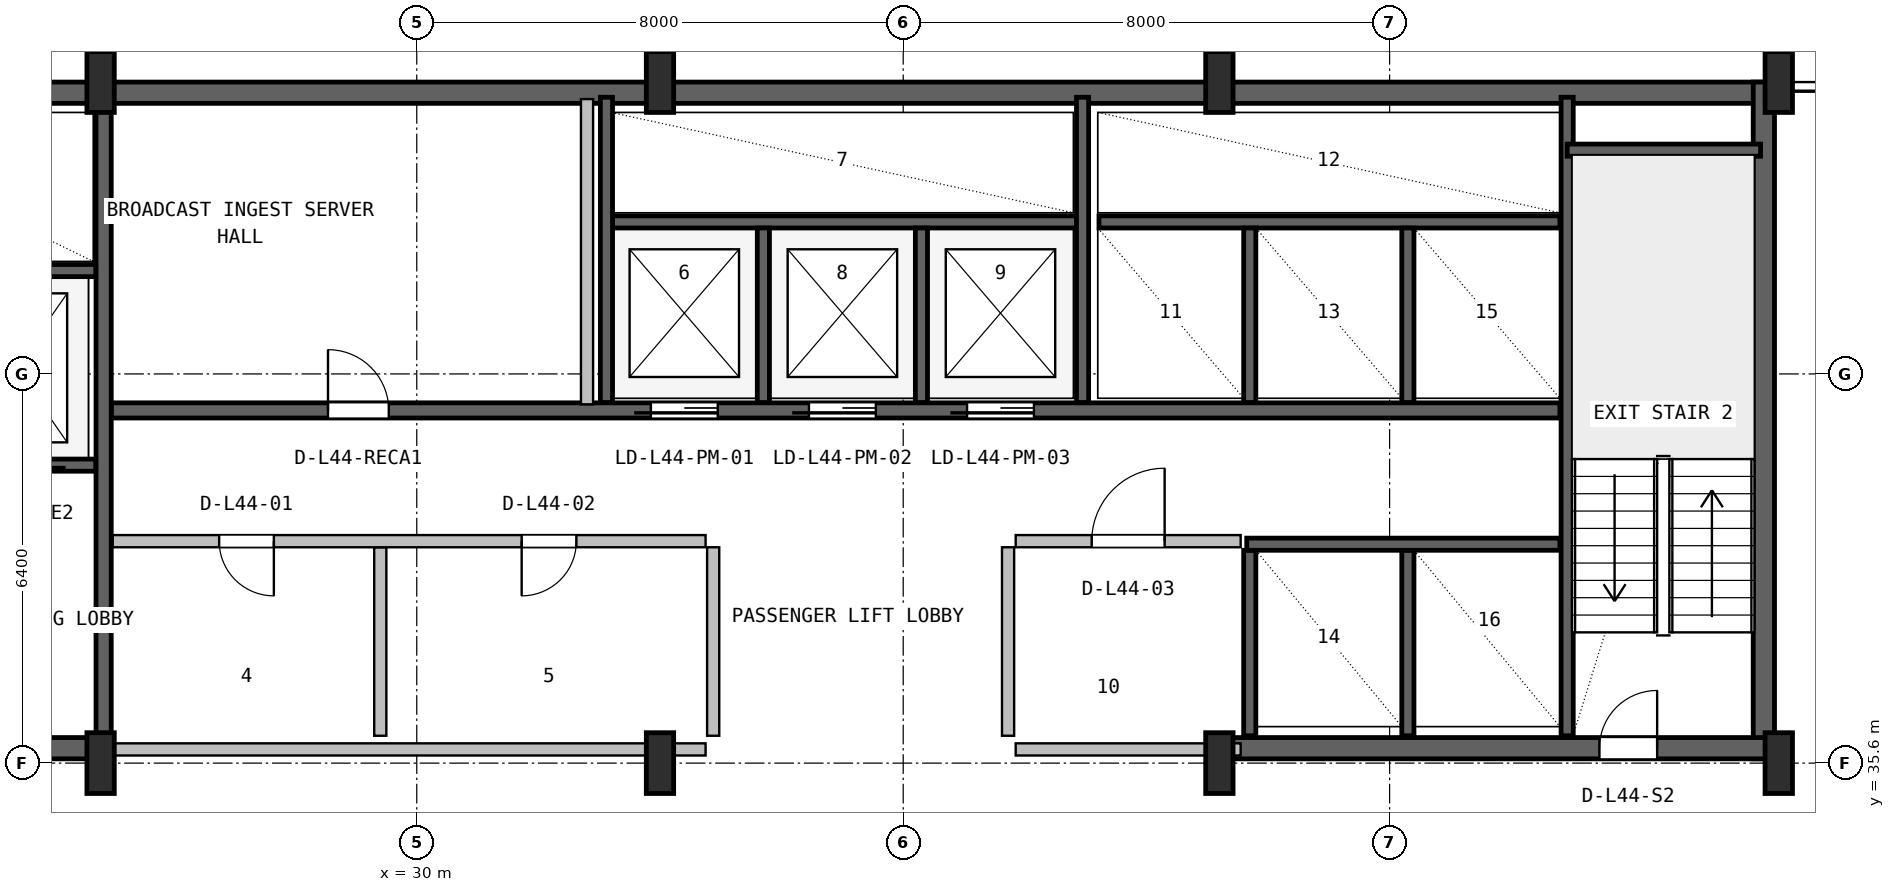
"""IFC4 building model, lengths in metres.
Left out: names, types, materials, properties, quantities, classifications, styles, units other than length and angle.
Written with IfcOpenShell. Run it as: python <this file> out.ifc"""

import sys

from ifc_helpers import new_model, si_unit, direction, frame, frame_2d, origin, origin_2d, place, context, subcontext, project, spatial, rectangle, i_section, extrude, source, transform, mapped, element, fill, save


model = new_model("IFC4")
c1 = context("Model", 3, precision=1e-05, world=origin(), true_north=direction((0.0, 1.0)))
c2 = subcontext(c1, "Body", "Model", "MODEL_VIEW")
j1 = project(units=[si_unit("LENGTHUNIT", "METRE"), si_unit("PLANEANGLEUNIT", "RADIAN")], contexts=[c1])
p1 = place(None, origin())
s1 = spatial("IfcSite", under=j1, at=p1, CompositionType="ELEMENT")
p2 = place(p1, origin())
s2 = spatial("IfcBuilding", under=s1, at=p2, CompositionType="ELEMENT")
p3 = place(p2, frame((0.0, 0.0, 180.0)))
s3 = spatial("IfcBuildingStorey", under=s2, at=p3, CompositionType="ELEMENT", Elevation=180.0)
p4 = place(p3, frame((15.6, 46.625, 0.0), z_axis=(0.0, 0.0, 1.0), x_axis=(1.0, 0.0, 0.0)))
e1 = element("IfcWall", 1, at=p4, inside=s3, PredefinedType="SHEAR", context=c2, shape_type="SweptSolid", body=[
    extrude(rectangle(XDim=36.8, YDim=0.35, at=frame_2d((18.4, 0.0))), origin(), (0.0, 0.0, 1.0), 3.55),
])
p5 = place(p3, frame((52.155, 35.67, 0.0), z_axis=(0.0, 0.0, 1.0), x_axis=(0.0, 1.0, 0.0)))
e2 = element("IfcWall", 2, at=p5, inside=s3, PredefinedType="SHEAR", context=c2, shape_type="SweptSolid", body=[
    extrude(rectangle(XDim=11.13, YDim=0.35, at=frame_2d((5.565, 0.0))), origin(), (0.0, 0.0, 1.0), 3.55),
])
p6 = place(p3, frame((15.67, 35.845, 0.0), z_axis=(0.0, 0.0, 1.0), x_axis=(1.0, 0.0, 0.0)))
e3 = element("IfcWall", 3, at=p6, inside=s3, PredefinedType="SHEAR", context=c2, shape_type="SweptSolid", body=[
    extrude(rectangle(XDim=9.13, YDim=0.35, at=frame_2d((4.565, 0.0))), origin(), (0.0, 0.0, 1.0), 3.55),
])
p7 = place(p6, frame((5.4, 0.0, 0.0)))
e4 = element("IfcOpeningElement", 4, at=p7, cuts=e3, PredefinedType="OPENING", context=c2, shape_type="SweptSolid", body=[
    extrude(rectangle(XDim=1.0, YDim=2.1, at=frame_2d((0.5, 1.05))), frame((0.0, 0.185, 0.0), z_axis=(0.0, -1.0, 0.0), x_axis=(1.0, 0.0, 0.0)), (0.0, 0.0, 1.0), 0.37),
])
p8 = place(p3, frame((43.2, 35.845, 0.0), z_axis=(0.0, 0.0, 1.0), x_axis=(1.0, 0.0, 0.0)))
e5 = element("IfcWall", 5, at=p8, inside=s3, PredefinedType="SHEAR", context=c2, shape_type="SweptSolid", body=[
    extrude(rectangle(XDim=9.13, YDim=0.35, at=frame_2d((4.565, 0.0))), origin(), (0.0, 0.0, 1.0), 3.55),
])
p9 = place(p8, frame((6.25, 0.0, 0.0)))
e6 = element("IfcOpeningElement", 6, at=p9, cuts=e5, PredefinedType="OPENING", context=c2, shape_type="SweptSolid", body=[
    extrude(rectangle(XDim=0.95, YDim=2.1, at=frame_2d((0.475, 1.05))), frame((0.0, 0.185, 0.0), z_axis=(0.0, -1.0, 0.0), x_axis=(1.0, 0.0, 0.0)), (0.0, 0.0, 1.0), 0.37),
])
m1 = source(origin(), c2, "Body", "SweptSolid", [
    extrude(i_section(OverallWidth=0.45, OverallDepth=1.0, WebThickness=0.016, FlangeThickness=0.03, FilletRadius=0.016, at=origin_2d()), origin(), (0.0, 0.0, 1.0), 3.8),
])
for number, where, z_axis, x_axis in (
    (7, (24.8, 35.6, 0.0), (0.0, 0.0, 1.0), (1.0, 0.0, 0.0)),
    (8, (24.8, 46.8, 0.0), (0.0, 0.0, 1.0), (1.0, 0.0, 0.0)),
    (9, (34.0, 35.6, 0.0), (0.0, 0.0, 1.0), (1.0, 0.0, 0.0)),
    (10, (34.0, 46.8, 0.0), (0.0, 0.0, 1.0), (1.0, 0.0, 0.0)),
    (11, (43.2, 35.6, 0.0), (0.0, 0.0, 1.0), (1.0, 0.0, 0.0)),
    (12, (43.2, 46.8, 0.0), (0.0, 0.0, 1.0), (1.0, 0.0, 0.0)),
    (13, (52.4, 35.6, 0.0), (0.0, 0.0, 1.0), (1.0, 0.0, 0.0)),
    (14, (52.4, 46.8, 0.0), (0.0, 0.0, 1.0), (1.0, 0.0, 0.0)),
):
    element("IfcColumn", number, at=place(p3, frame(where, z_axis=z_axis, x_axis=x_axis)), inside=s3, PredefinedType="COLUMN", context=c2, shape_type="MappedRepresentation", body=[
        mapped(m1, transform((0.0, 0.0, 0.0), x_axis=(1.0, 0.0, 0.0), y_axis=(0.0, 1.0, 0.0), z_axis=(0.0, 0.0, 1.0), scale=1.0)),
    ])
p10 = place(p3, frame((24.85, 36.05, 0.0), z_axis=(0.0, 0.0, 1.0), x_axis=(0.0, 1.0, 0.0)))
e15 = element("IfcWall", 15, at=p10, inside=s3, PredefinedType="SHEAR", context=c2, shape_type="SweptSolid", body=[
    extrude(rectangle(XDim=10.45, YDim=0.25, at=frame_2d((5.225, 0.0))), origin(), (0.0, 0.0, 1.0), 3.55),
])
p11 = place(p3, frame((19.2, 40.5, 0.0), z_axis=(0.0, 0.0, 1.0), x_axis=(1.0, 0.0, 0.0)))
e16 = element("IfcWall", 16, at=p11, inside=s3, PredefinedType="SHEAR", context=c2, shape_type="SweptSolid", body=[
    extrude(rectangle(XDim=5.52, YDim=0.2, at=frame_2d((2.76, 0.0))), origin(), (0.0, 0.0, 1.0), 3.55),
])
p12 = place(p11, frame((1.05, 0.0, 0.0)))
e17 = element("IfcOpeningElement", 17, at=p12, cuts=e16, PredefinedType="OPENING", context=c2, shape_type="SweptSolid", body=[
    extrude(rectangle(XDim=1.1, YDim=2.18, at=frame_2d((0.55, 1.09))), frame((0.0, 0.11, 0.0), z_axis=(0.0, -1.0, 0.0), x_axis=(1.0, 0.0, 0.0)), (0.0, 0.0, 1.0), 0.22),
])
p13 = place(p11, frame((3.65, 0.0, 0.0)))
e18 = element("IfcOpeningElement", 18, at=p13, cuts=e16, PredefinedType="OPENING", context=c2, shape_type="SweptSolid", body=[
    extrude(rectangle(XDim=1.1, YDim=2.18, at=frame_2d((0.55, 1.09))), frame((0.0, 0.11, 0.0), z_axis=(0.0, -1.0, 0.0), x_axis=(1.0, 0.0, 0.0)), (0.0, 0.0, 1.0), 0.22),
])
p14 = place(p3, frame((19.2, 43.7, 0.0), z_axis=(0.0, 0.0, 1.0), x_axis=(1.0, 0.0, 0.0)))
e19 = element("IfcWall", 19, at=p14, inside=s3, PredefinedType="SHEAR", context=c2, shape_type="SweptSolid", body=[
    extrude(rectangle(XDim=5.52, YDim=0.2, at=frame_2d((2.76, 0.0))), origin(), (0.0, 0.0, 1.0), 3.55),
])
p15 = place(p3, frame((48.92, 36.05, 0.0), z_axis=(0.0, 0.0, 1.0), x_axis=(0.0, 1.0, 0.0)))
e20 = element("IfcWall", 20, at=p15, inside=s3, PredefinedType="SHEAR", context=c2, shape_type="SweptSolid", body=[
    extrude(rectangle(XDim=10.5, YDim=0.2, at=frame_2d((5.25, 0.0))), origin(), (0.0, 0.0, 1.0), 3.55),
])
p16 = place(p3, frame((48.92, 45.68, 0.0), z_axis=(0.0, 0.0, 1.0), x_axis=(1.0, 0.0, 0.0)))
e21 = element("IfcWall", 21, at=p16, inside=s3, PredefinedType="SHEAR", context=c2, shape_type="SweptSolid", body=[
    extrude(rectangle(XDim=3.18, YDim=0.2, at=frame_2d((1.59, 0.0))), origin(), (0.0, 0.0, 1.0), 3.55),
])
p17 = place(p3, frame((24.98, 41.4, 0.0), z_axis=(0.0, 0.0, 1.0), x_axis=(1.0, 0.0, 0.0)))
e22 = element("IfcWall", 22, at=p17, inside=s3, PredefinedType="SHEAR", context=c2, shape_type="SweptSolid", body=[
    extrude(rectangle(XDim=23.82, YDim=0.25, at=frame_2d((11.91, 0.0))), origin(), (0.0, 0.0, 1.0), 3.55),
])
p18 = place(p17, frame((8.87, 0.0, 0.0)))
e23 = element("IfcOpeningElement", 23, at=p18, cuts=e22, PredefinedType="OPENING", context=c2, shape_type="SweptSolid", body=[
    extrude(rectangle(XDim=1.1, YDim=2.18, at=frame_2d((0.55, 1.09))), frame((0.0, 0.135, 0.0), z_axis=(0.0, -1.0, 0.0), x_axis=(1.0, 0.0, 0.0)), (0.0, 0.0, 1.0), 0.27),
])
p19 = place(p17, frame((11.47, 0.0, 0.0)))
e24 = element("IfcOpeningElement", 24, at=p19, cuts=e22, PredefinedType="OPENING", context=c2, shape_type="SweptSolid", body=[
    extrude(rectangle(XDim=1.1, YDim=2.18, at=frame_2d((0.55, 1.09))), frame((0.0, 0.135, 0.0), z_axis=(0.0, -1.0, 0.0), x_axis=(1.0, 0.0, 0.0)), (0.0, 0.0, 1.0), 0.27),
])
p20 = place(p17, frame((14.07, 0.0, 0.0)))
e25 = element("IfcOpeningElement", 25, at=p20, cuts=e22, PredefinedType="OPENING", context=c2, shape_type="SweptSolid", body=[
    extrude(rectangle(XDim=1.1, YDim=2.18, at=frame_2d((0.55, 1.09))), frame((0.0, 0.135, 0.0), z_axis=(0.0, -1.0, 0.0), x_axis=(1.0, 0.0, 0.0)), (0.0, 0.0, 1.0), 0.27),
])
p21 = place(p17, frame((3.56, 0.0, 0.0)))
e26 = element("IfcOpeningElement", 26, at=p21, cuts=e22, PredefinedType="OPENING", context=c2, shape_type="SweptSolid", body=[
    extrude(rectangle(XDim=1.0, YDim=2.08, at=frame_2d((0.5, 1.04))), frame((0.0, 0.135, 0.0), z_axis=(0.0, -1.0, 0.0), x_axis=(1.0, 0.0, 0.0)), (0.0, 0.0, 1.0), 0.27),
])
p22 = place(p3, frame((33.22, 44.5, 0.0), z_axis=(0.0, 0.0, 1.0), x_axis=(1.0, 0.0, 0.0)))
e27 = element("IfcWall", 27, at=p22, inside=s3, PredefinedType="SHEAR", context=c2, shape_type="SweptSolid", body=[
    extrude(rectangle(XDim=7.63, YDim=0.2, at=frame_2d((3.815, 0.0))), origin(), (0.0, 0.0, 1.0), 3.55),
])
p23 = place(p3, frame((33.12, 41.53, 0.0), z_axis=(0.0, 0.0, 1.0), x_axis=(0.0, 1.0, 0.0)))
e28 = element("IfcWall", 28, at=p23, inside=s3, PredefinedType="SHEAR", context=c2, shape_type="SweptSolid", body=[
    extrude(rectangle(XDim=5.02, YDim=0.2, at=frame_2d((2.51, 0.0))), origin(), (0.0, 0.0, 1.0), 3.55),
])
for number, where, z_axis, x_axis in (
    (29, (35.7, 41.53, 0.0), (0.0, 0.0, 1.0), (0.0, 1.0, 0.0)),
    (30, (38.3, 41.53, 0.0), (0.0, 0.0, 1.0), (0.0, 1.0, 0.0)),
):
    element("IfcWall", number, at=place(p3, frame(where, z_axis=z_axis, x_axis=x_axis)), inside=s3, PredefinedType="SHEAR", context=c2, shape_type="SweptSolid", body=[
        extrude(rectangle(XDim=2.87, YDim=0.2, at=frame_2d((1.435, 0.0))), origin(), (0.0, 0.0, 1.0), 3.55),
    ])
p24 = place(p3, frame((40.95, 41.53, 0.0), z_axis=(0.0, 0.0, 1.0), x_axis=(0.0, 1.0, 0.0)))
e31 = element("IfcWall", 31, at=p24, inside=s3, PredefinedType="SHEAR", context=c2, shape_type="SweptSolid", body=[
    extrude(rectangle(XDim=5.02, YDim=0.2, at=frame_2d((2.51, 0.0))), origin(), (0.0, 0.0, 1.0), 3.55),
])
p25 = place(p3, frame((41.22, 44.5, 0.0), z_axis=(0.0, 0.0, 1.0), x_axis=(1.0, 0.0, 0.0)))
e32 = element("IfcWall", 32, at=p25, inside=s3, PredefinedType="SHEAR", context=c2, shape_type="SweptSolid", body=[
    extrude(rectangle(XDim=7.58, YDim=0.2, at=frame_2d((3.79, 0.0))), origin(), (0.0, 0.0, 1.0), 3.55),
])
for number, where, z_axis, x_axis in (
    (33, (43.7, 41.53, 0.0), (0.0, 0.0, 1.0), (0.0, 1.0, 0.0)),
    (34, (46.3, 41.53, 0.0), (0.0, 0.0, 1.0), (0.0, 1.0, 0.0)),
):
    element("IfcWall", number, at=place(p3, frame(where, z_axis=z_axis, x_axis=x_axis)), inside=s3, PredefinedType="SHEAR", context=c2, shape_type="SweptSolid", body=[
        extrude(rectangle(XDim=2.87, YDim=0.2, at=frame_2d((1.435, 0.0))), origin(), (0.0, 0.0, 1.0), 3.55),
    ])
for number, where, z_axis, x_axis in (
    (35, (43.7, 36.05, 0.0), (0.0, 0.0, 1.0), (0.0, 1.0, 0.0)),
    (36, (46.3, 36.05, 0.0), (0.0, 0.0, 1.0), (0.0, 1.0, 0.0)),
):
    element("IfcWall", number, at=place(p3, frame(where, z_axis=z_axis, x_axis=x_axis)), inside=s3, PredefinedType="SHEAR", context=c2, shape_type="SweptSolid", body=[
        extrude(rectangle(XDim=3.05, YDim=0.2, at=frame_2d((1.525, 0.0))), origin(), (0.0, 0.0, 1.0), 3.55),
    ])
p26 = place(p3, frame((43.65, 39.2, 0.0), z_axis=(0.0, 0.0, 1.0), x_axis=(1.0, 0.0, 0.0)))
e37 = element("IfcWall", 37, at=p26, inside=s3, PredefinedType="SHEAR", context=c2, shape_type="SweptSolid", body=[
    extrude(rectangle(XDim=5.15, YDim=0.2, at=frame_2d((2.575, 0.0))), origin(), (0.0, 0.0, 1.0), 3.55),
])
p27 = place(p3, frame((25.0, 35.825, 0.0), z_axis=(0.0, 0.0, 1.0), x_axis=(1.0, 0.0, 0.0)))
e38 = element("IfcWall", 38, at=p27, inside=s3, PredefinedType="PLUMBINGWALL", context=c2, shape_type="SweptSolid", body=[
    extrude(rectangle(XDim=9.75, YDim=0.2, at=frame_2d((4.875, 0.0))), origin(), (0.0, 0.0, 1.0), 2.575),
])
p28 = place(p3, frame((29.4, 36.05, 0.0), z_axis=(0.0, 0.0, 1.0), x_axis=(0.0, 1.0, 0.0)))
e39 = element("IfcWall", 39, at=p28, inside=s3, PredefinedType="PLUMBINGWALL", context=c2, shape_type="SweptSolid", body=[
    extrude(rectangle(XDim=3.1, YDim=0.2, at=frame_2d((1.55, 0.0))), origin(), (0.0, 0.0, 1.0), 3.53),
])
p29 = place(p3, frame((25.0, 39.25, 0.0), z_axis=(0.0, 0.0, 1.0), x_axis=(1.0, 0.0, 0.0)))
e40 = element("IfcWall", 40, at=p29, inside=s3, PredefinedType="PLUMBINGWALL", context=c2, shape_type="SweptSolid", body=[
    extrude(rectangle(XDim=9.75, YDim=0.2, at=frame_2d((4.875, 0.0))), origin(), (0.0, 0.0, 1.0), 3.53),
])
p30 = place(p29, frame((1.75, 0.0, 0.0)))
e41 = element("IfcOpeningElement", 41, at=p30, cuts=e40, PredefinedType="OPENING", context=c2, shape_type="SweptSolid", body=[
    extrude(rectangle(XDim=0.9, YDim=2.06, at=frame_2d((0.45, 1.03))), frame((0.0, 0.11, 0.0), z_axis=(0.0, -1.0, 0.0), x_axis=(1.0, 0.0, 0.0)), (0.0, 0.0, 1.0), 0.22),
])
p31 = place(p29, frame((6.725, 0.0, 0.0)))
e42 = element("IfcOpeningElement", 42, at=p31, cuts=e40, PredefinedType="OPENING", context=c2, shape_type="SweptSolid", body=[
    extrude(rectangle(XDim=0.9, YDim=2.06, at=frame_2d((0.45, 1.03))), frame((0.0, 0.11, 0.0), z_axis=(0.0, -1.0, 0.0), x_axis=(1.0, 0.0, 0.0)), (0.0, 0.0, 1.0), 0.22),
])
p32 = place(p3, frame((34.875, 36.05, 0.0), z_axis=(0.0, 0.0, 1.0), x_axis=(0.0, 1.0, 0.0)))
e43 = element("IfcWall", 43, at=p32, inside=s3, PredefinedType="PLUMBINGWALL", context=c2, shape_type="SweptSolid", body=[
    extrude(rectangle(XDim=3.1, YDim=0.2, at=frame_2d((1.55, 0.0))), origin(), (0.0, 0.0, 1.0), 3.53),
])
p33 = place(p3, frame((39.85, 35.825, 0.0), z_axis=(0.0, 0.0, 1.0), x_axis=(1.0, 0.0, 0.0)))
e44 = element("IfcWall", 44, at=p33, inside=s3, PredefinedType="SOLIDWALL", context=c2, shape_type="SweptSolid", body=[
    extrude(rectangle(XDim=3.7, YDim=0.2, at=frame_2d((1.85, 0.0))), origin(), (0.0, 0.0, 1.0), 2.575),
])
p34 = place(p3, frame((39.85, 39.25, 0.0), z_axis=(0.0, 0.0, 1.0), x_axis=(1.0, 0.0, 0.0)))
e45 = element("IfcWall", 45, at=p34, inside=s3, PredefinedType="SOLIDWALL", context=c2, shape_type="SweptSolid", body=[
    extrude(rectangle(XDim=3.7, YDim=0.2, at=frame_2d((1.85, 0.0))), origin(), (0.0, 0.0, 1.0), 3.53),
])
p35 = place(p34, frame((1.25, 0.0, 0.0)))
e46 = element("IfcOpeningElement", 46, at=p35, cuts=e45, PredefinedType="OPENING", context=c2, shape_type="SweptSolid", body=[
    extrude(rectangle(XDim=1.2, YDim=2.1, at=frame_2d((0.6, 1.05))), frame((0.0, 0.11, 0.0), z_axis=(0.0, -1.0, 0.0), x_axis=(1.0, 0.0, 0.0)), (0.0, 0.0, 1.0), 0.22),
])
p36 = place(p3, frame((39.725, 36.05, 0.0), z_axis=(0.0, 0.0, 1.0), x_axis=(0.0, 1.0, 0.0)))
e47 = element("IfcWall", 47, at=p36, inside=s3, PredefinedType="SOLIDWALL", context=c2, shape_type="SweptSolid", body=[
    extrude(rectangle(XDim=3.1, YDim=0.2, at=frame_2d((1.55, 0.0))), origin(), (0.0, 0.0, 1.0), 3.53),
])
p37 = place(p3, frame((32.8, 41.5, 0.0), z_axis=(0.0, 0.0, 1.0), x_axis=(0.0, 1.0, 0.0)))
e48 = element("IfcWall", 48, at=p37, inside=s3, PredefinedType="SOLIDWALL", context=c2, shape_type="SweptSolid", body=[
    extrude(rectangle(XDim=5.02, YDim=0.2, at=frame_2d((2.51, 0.0))), origin(), (0.0, 0.0, 1.0), 3.53),
])
m2 = source(origin(), c2, "Body", "SweptSolid", [
    extrude(rectangle(XDim=0.95, YDim=2.1, at=frame_2d((0.475, 1.05))), frame((0.0, 0.025, 0.0), z_axis=(0.0, -1.0, 0.0), x_axis=(1.0, 0.0, 0.0)), (0.0, 0.0, 1.0), 0.05),
])
p38 = place(p9, origin())
e49 = element("IfcDoor", 49, at=p38, inside=s3, OperationType="SINGLE_SWING_RIGHT", PredefinedType="DOOR", context=c2, shape_type="MappedRepresentation", body=[
    mapped(m2, transform((0.0, 0.0, 0.0), x_axis=(1.0, 0.0, 0.0), y_axis=(0.0, 1.0, 0.0), z_axis=(0.0, 0.0, 1.0), scale=1.0)),
])
fill(e6, e49)
m3 = source(origin(), c2, "Body", "SweptSolid", [
    extrude(rectangle(XDim=1.1, YDim=2.18, at=frame_2d((0.55, 1.09))), frame((0.0, 0.025, 0.0), z_axis=(0.0, -1.0, 0.0), x_axis=(1.0, 0.0, 0.0)), (0.0, 0.0, 1.0), 0.05),
])
p39 = place(p18, frame((1.1, 0.0, 0.0), z_axis=(0.0, 0.0, 1.0), x_axis=(-1.0, 0.0, 0.0)))
e50 = element("IfcDoor", 50, at=p39, inside=s3, OperationType="SLIDING_TO_LEFT", PredefinedType="DOOR", context=c2, shape_type="MappedRepresentation", body=[
    mapped(m3, transform((0.0, 0.0, 0.0), x_axis=(1.0, 0.0, 0.0), y_axis=(0.0, 1.0, 0.0), z_axis=(0.0, 0.0, 1.0), scale=1.0)),
])
fill(e23, e50)
p40 = place(p19, frame((1.1, 0.0, 0.0), z_axis=(0.0, 0.0, 1.0), x_axis=(-1.0, 0.0, 0.0)))
e51 = element("IfcDoor", 51, at=p40, inside=s3, OperationType="SLIDING_TO_LEFT", PredefinedType="DOOR", context=c2, shape_type="MappedRepresentation", body=[
    mapped(m3, transform((0.0, 0.0, 0.0), x_axis=(1.0, 0.0, 0.0), y_axis=(0.0, 1.0, 0.0), z_axis=(0.0, 0.0, 1.0), scale=1.0)),
])
fill(e24, e51)
p41 = place(p20, frame((1.1, 0.0, 0.0), z_axis=(0.0, 0.0, 1.0), x_axis=(-1.0, 0.0, 0.0)))
e52 = element("IfcDoor", 52, at=p41, inside=s3, OperationType="SLIDING_TO_LEFT", PredefinedType="DOOR", context=c2, shape_type="MappedRepresentation", body=[
    mapped(m3, transform((0.0, 0.0, 0.0), x_axis=(1.0, 0.0, 0.0), y_axis=(0.0, 1.0, 0.0), z_axis=(0.0, 0.0, 1.0), scale=1.0)),
])
fill(e25, e52)
m4 = source(origin(), c2, "Body", "SweptSolid", [
    extrude(rectangle(XDim=1.0, YDim=2.08, at=frame_2d((0.5, 1.04))), frame((0.0, 0.025, 0.0), z_axis=(0.0, -1.0, 0.0), x_axis=(1.0, 0.0, 0.0)), (0.0, 0.0, 1.0), 0.05),
])
p42 = place(p21, origin())
e53 = element("IfcDoor", 53, at=p42, inside=s3, OperationType="SINGLE_SWING_LEFT", PredefinedType="DOOR", context=c2, shape_type="MappedRepresentation", body=[
    mapped(m4, transform((0.0, 0.0, 0.0), x_axis=(1.0, 0.0, 0.0), y_axis=(0.0, 1.0, 0.0), z_axis=(0.0, 0.0, 1.0), scale=1.0)),
])
fill(e26, e53)
m5 = source(origin(), c2, "Body", "SweptSolid", [
    extrude(rectangle(XDim=0.9, YDim=2.06, at=frame_2d((0.45, 1.03))), frame((0.0, 0.025, 0.0), z_axis=(0.0, -1.0, 0.0), x_axis=(1.0, 0.0, 0.0)), (0.0, 0.0, 1.0), 0.05),
])
p43 = place(p30, frame((0.9, 0.0, 0.0), z_axis=(0.0, 0.0, 1.0), x_axis=(-1.0, 0.0, 0.0)))
e54 = element("IfcDoor", 54, at=p43, inside=s3, OperationType="SINGLE_SWING_RIGHT", PredefinedType="DOOR", context=c2, shape_type="MappedRepresentation", body=[
    mapped(m5, transform((0.0, 0.0, 0.0), x_axis=(1.0, 0.0, 0.0), y_axis=(0.0, 1.0, 0.0), z_axis=(0.0, 0.0, 1.0), scale=1.0)),
])
fill(e41, e54)
p44 = place(p31, frame((0.9, 0.0, 0.0), z_axis=(0.0, 0.0, 1.0), x_axis=(-1.0, 0.0, 0.0)))
e55 = element("IfcDoor", 55, at=p44, inside=s3, OperationType="SINGLE_SWING_LEFT", PredefinedType="DOOR", context=c2, shape_type="MappedRepresentation", body=[
    mapped(m5, transform((0.0, 0.0, 0.0), x_axis=(1.0, 0.0, 0.0), y_axis=(0.0, 1.0, 0.0), z_axis=(0.0, 0.0, 1.0), scale=1.0)),
])
fill(e42, e55)
m6 = source(origin(), c2, "Body", "SweptSolid", [
    extrude(rectangle(XDim=1.2, YDim=2.1, at=frame_2d((0.6, 1.05))), frame((0.0, 0.025, 0.0), z_axis=(0.0, -1.0, 0.0), x_axis=(1.0, 0.0, 0.0)), (0.0, 0.0, 1.0), 0.05),
])
p45 = place(p35, origin())
e56 = element("IfcDoor", 56, at=p45, inside=s3, OperationType="SINGLE_SWING_RIGHT", PredefinedType="DOOR", context=c2, shape_type="MappedRepresentation", body=[
    mapped(m6, transform((0.0, 0.0, 0.0), x_axis=(1.0, 0.0, 0.0), y_axis=(0.0, 1.0, 0.0), z_axis=(0.0, 0.0, 1.0), scale=1.0)),
])
fill(e46, e56)
save(model, sys.argv[1])
